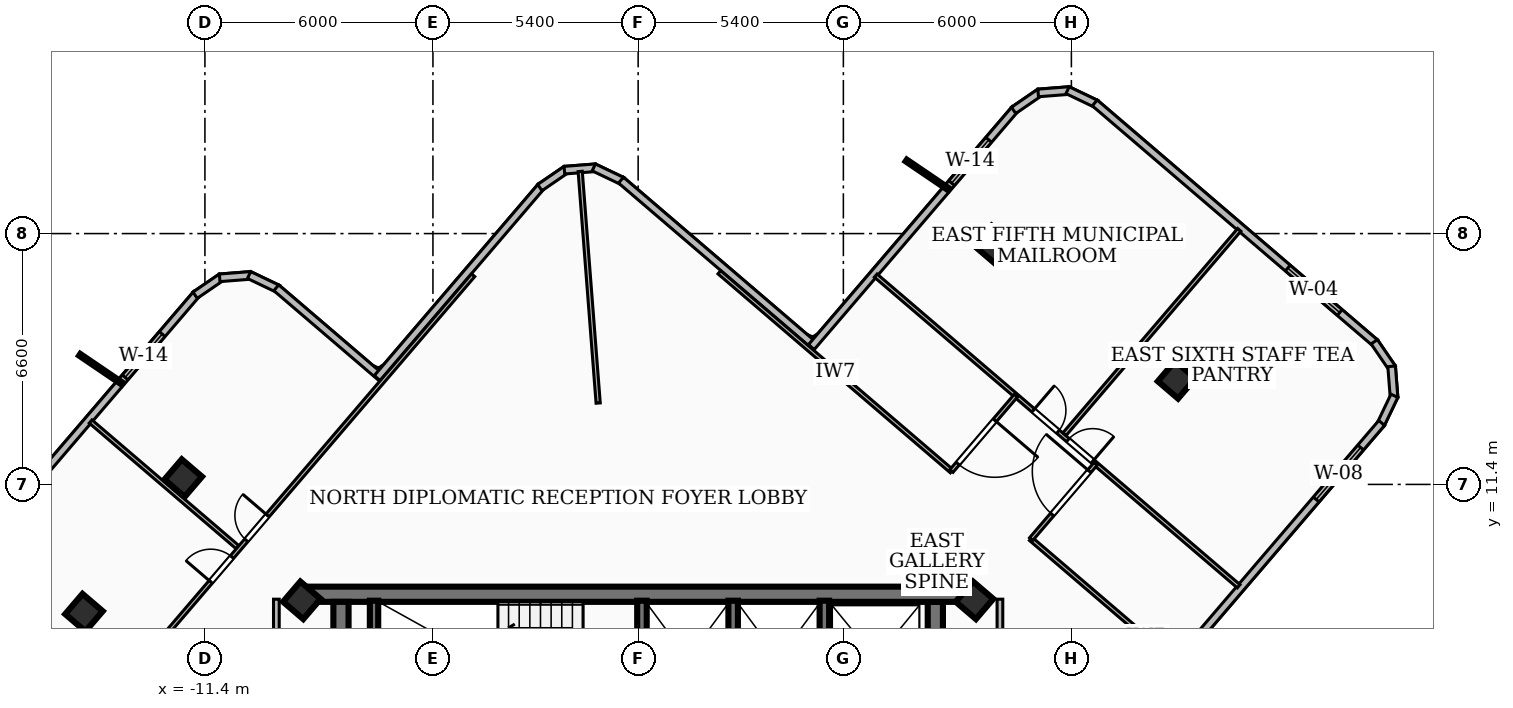
"""IFC4 building model, lengths in metres.
Left out: names, types, materials, properties, quantities, classifications, styles, units other than length and angle.
Written with IfcOpenShell. Run it as: python <this file> out.ifc"""

import sys

from ifc_helpers import new_model, si_unit, direction, frame, frame_2d, origin, origin_2d, place, context, subcontext, project, spatial, rectangle, extrude, element, fill, save


model = new_model("IFC4")
c1 = context("Model", 3, precision=1e-05, world=origin(), true_north=direction((0.0, 1.0)))
c2 = subcontext(c1, "Body", "Model", "MODEL_VIEW")
j1 = project(units=[si_unit("LENGTHUNIT", "METRE"), si_unit("PLANEANGLEUNIT", "RADIAN")], contexts=[c1])
p1 = place(None, origin())
s1 = spatial("IfcSite", under=j1, at=p1, CompositionType="ELEMENT")
p2 = place(p1, origin())
s2 = spatial("IfcBuilding", under=s1, at=p2, CompositionType="ELEMENT")
p3 = place(p2, frame((0.0, 0.0, 250.92)))
s3 = spatial("IfcBuildingStorey", under=s2, at=p3, CompositionType="ELEMENT", Elevation=250.92)
p4 = place(p3, frame((-8.78, 8.51, 0.0), z_axis=(0.0, 0.0, 1.0), x_axis=(1.0, 0.0, 0.0)))
e1 = element("IfcWall", 1, at=p4, inside=s3, PredefinedType="SHEAR", context=c2, shape_type="SweptSolid", body=[
    extrude(rectangle(XDim=17.56, YDim=0.4, at=frame_2d((8.78, 0.0))), origin(), (0.0, 0.0, 1.0), 3.16),
])
for number, where, z_axis, x_axis in (
    (2, (-7.82, 1.95, 0.0), (0.0, 0.0, 1.0), (0.0, 1.0, 0.0)),
    (3, (7.82, 8.31, 0.0), (0.0, 0.0, 1.0), (0.0, -1.0, 0.0)),
):
    element("IfcWall", number, at=place(p3, frame(where, z_axis=z_axis, x_axis=x_axis)), inside=s3, PredefinedType="SHEAR", context=c2, shape_type="SweptSolid", body=[
        extrude(rectangle(XDim=6.36, YDim=0.4, at=frame_2d((3.18, 0.0))), origin(), (0.0, 0.0, 1.0), 3.16),
    ])
p5 = place(p3, frame((-6.95, 5.28, 0.0), z_axis=(0.0, 0.0, 1.0), x_axis=(0.0, 1.0, 0.0)))
e4 = element("IfcWall", 4, at=p5, inside=s3, PredefinedType="SOLIDWALL", context=c2, shape_type="SweptSolid", body=[
    extrude(rectangle(XDim=3.06, YDim=0.22, at=frame_2d((1.53, 0.0))), origin(), (0.0, 0.0, 1.0), 3.16),
])
for number, where, z_axis, x_axis in (
    (5, (0.1, 5.3, 0.0), (0.0, 0.0, 1.0), (0.0, 1.0, 0.0)),
    (6, (2.5, 5.3, 0.0), (0.0, 0.0, 1.0), (0.0, 1.0, 0.0)),
    (7, (4.9, 5.3, 0.0), (0.0, 0.0, 1.0), (0.0, 1.0, 0.0)),
):
    element("IfcWall", number, at=place(p3, frame(where, z_axis=z_axis, x_axis=x_axis)), inside=s3, PredefinedType="SOLIDWALL", context=c2, shape_type="SweptSolid", body=[
        extrude(rectangle(XDim=3.04, YDim=0.25, at=frame_2d((1.52, 0.0))), origin(), (0.0, 0.0, 1.0), 3.16),
    ])
for number, where, z_axis, x_axis in (
    (8, (-8.85, 8.35, 0.0), (0.0, 0.0, 1.0), (0.65, 0.76, 0.0)),
    (9, (8.85, 8.35, 0.0), (0.0, 0.0, 1.0), (0.65, 0.76, 0.0)),
    (10, (14.169, 14.152, 0.0), (0.0, 0.0, 1.0), (0.65, 0.76, 0.0)),
    (11, (9.341, 17.714, 0.0), (0.0, 0.0, 1.0), (0.65, 0.76, 0.0)),
    (12, (-11.971, 11.566, 0.0), (0.0, 0.0, 1.0), (0.65, 0.76, 0.0)),
    (13, (-14.583, 8.026, 0.0), (0.0, 0.0, 1.0), (0.65, 0.76, 0.0)),
):
    element("IfcColumn", number, at=place(p3, frame(where, z_axis=z_axis, x_axis=x_axis)), inside=s3, PredefinedType="COLUMN", context=c2, shape_type="SweptSolid", body=[
        extrude(rectangle(XDim=0.7, YDim=0.7, at=origin_2d()), origin(), (0.0, 0.0, 1.0), 3.42),
    ])
p6 = place(p3, frame((-17.943, 9.024, 0.0), z_axis=(0.0, 0.0, 1.0), x_axis=(0.650218389303, 0.759747356831, 0.0)))
e14 = element("IfcWall", 14, at=p6, inside=s3, PredefinedType="SOLIDWALL", context=c2, shape_type="SweptSolid", body=[
    extrude(rectangle(XDim=9.723, YDim=0.2, at=frame_2d((4.861, 0.0))), origin(), (0.0, 0.0, 1.0), 3.16),
])
p7 = place(p6, frame((6.834, 0.0, 0.85)))
e15 = element("IfcOpeningElement", 15, at=p7, cuts=e14, PredefinedType="OPENING", context=c2, shape_type="SweptSolid", body=[
    extrude(rectangle(XDim=1.5, YDim=1.5, at=frame_2d((0.75, 0.75))), frame((0.0, 0.11, 0.0), z_axis=(0.0, -1.0, 0.0), x_axis=(1.0, 0.0, 0.0)), (0.0, 0.0, 1.0), 0.22),
])
p8 = place(p3, frame((-11.658, 16.378, 0.0), z_axis=(0.0, 0.0, 1.0), x_axis=(0.824907237821, 0.565268121329, 0.0)))
e16 = element("IfcWall", 16, at=p8, inside=s3, PredefinedType="SOLIDWALL", context=c2, shape_type="SweptSolid", body=[
    extrude(rectangle(XDim=0.839, YDim=0.2, at=frame_2d((0.419, 0.0))), origin(), (0.0, 0.0, 1.0), 3.16),
])
p9 = place(p3, frame((-11.012, 16.836, 0.0), z_axis=(0.0, 0.0, 1.0), x_axis=(0.996986164412, 0.077579558977, 0.0)))
e17 = element("IfcWall", 17, at=p9, inside=s3, PredefinedType="SOLIDWALL", context=c2, shape_type="SweptSolid", body=[
    extrude(rectangle(XDim=0.824, YDim=0.2, at=frame_2d((0.412, 0.0))), origin(), (0.0, 0.0, 1.0), 3.16),
])
p10 = place(p3, frame((-10.238, 16.909, 0.0), z_axis=(0.0, 0.0, 1.0), x_axis=(0.902473334209, -0.430745726666, 0.0)))
e18 = element("IfcWall", 18, at=p10, inside=s3, PredefinedType="SOLIDWALL", context=c2, shape_type="SweptSolid", body=[
    extrude(rectangle(XDim=0.84, YDim=0.2, at=frame_2d((0.42, 0.0))), origin(), (0.0, 0.0, 1.0), 3.16),
])
p11 = place(p3, frame((-9.522, 16.574, 0.0), z_axis=(0.0, 0.0, 1.0), x_axis=(0.759914066759, -0.650023546606, 0.0)))
e19 = element("IfcWall", 19, at=p11, inside=s3, PredefinedType="SOLIDWALL", context=c2, shape_type="SweptSolid", body=[
    extrude(rectangle(XDim=3.641, YDim=0.2, at=frame_2d((1.821, 0.0))), origin(), (0.0, 0.0, 1.0), 3.16),
])
p12 = place(p3, frame((-6.868, 14.198, 0.0), z_axis=(0.0, 0.0, 1.0), x_axis=(0.650240147413, 0.759728734939, 0.0)))
e20 = element("IfcWall", 20, at=p12, inside=s3, PredefinedType="SOLIDWALL", context=c2, shape_type="SweptSolid", body=[
    extrude(rectangle(XDim=6.64, YDim=0.2, at=frame_2d((3.32, 0.0))), origin(), (0.0, 0.0, 1.0), 3.16),
])
p13 = place(p3, frame((-2.587, 19.21, 0.0), z_axis=(0.0, 0.0, 1.0), x_axis=(0.824907237821, 0.565268121329, 0.0)))
e21 = element("IfcWall", 21, at=p13, inside=s3, PredefinedType="SOLIDWALL", context=c2, shape_type="SweptSolid", body=[
    extrude(rectangle(XDim=0.839, YDim=0.2, at=frame_2d((0.419, 0.0))), origin(), (0.0, 0.0, 1.0), 3.16),
])
p14 = place(p3, frame((-1.941, 19.668, 0.0), z_axis=(0.0, 0.0, 1.0), x_axis=(0.996986164412, 0.077579558977, 0.0)))
e22 = element("IfcWall", 22, at=p14, inside=s3, PredefinedType="SOLIDWALL", context=c2, shape_type="SweptSolid", body=[
    extrude(rectangle(XDim=0.824, YDim=0.2, at=frame_2d((0.412, 0.0))), origin(), (0.0, 0.0, 1.0), 3.16),
])
p15 = place(p3, frame((-1.167, 19.741, 0.0), z_axis=(0.0, 0.0, 1.0), x_axis=(0.902360330408, -0.430982405796, 0.0)))
e23 = element("IfcWall", 23, at=p15, inside=s3, PredefinedType="SOLIDWALL", context=c2, shape_type="SweptSolid", body=[
    extrude(rectangle(XDim=0.84, YDim=0.2, at=frame_2d((0.42, 0.0))), origin(), (0.0, 0.0, 1.0), 3.16),
])
p16 = place(p3, frame((-0.451, 19.406, 0.0), z_axis=(0.0, 0.0, 1.0), x_axis=(0.759775314842, -0.650185720357, 0.0)))
e24 = element("IfcWall", 24, at=p16, inside=s3, PredefinedType="SOLIDWALL", context=c2, shape_type="SweptSolid", body=[
    extrude(rectangle(XDim=6.741, YDim=0.2, at=frame_2d((3.371, 0.0))), origin(), (0.0, 0.0, 1.0), 3.16),
])
p17 = place(p3, frame((4.558, 15.014, 0.0), z_axis=(0.0, 0.0, 1.0), x_axis=(0.650254487329, 0.759716461391, 0.0)))
e25 = element("IfcWall", 25, at=p17, inside=s3, PredefinedType="SOLIDWALL", context=c2, shape_type="SweptSolid", body=[
    extrude(rectangle(XDim=8.241, YDim=0.2, at=frame_2d((4.121, 0.0))), origin(), (0.0, 0.0, 1.0), 3.16),
])
p18 = place(p17, frame((5.678, 0.0, 0.85)))
e26 = element("IfcOpeningElement", 26, at=p18, cuts=e25, PredefinedType="OPENING", context=c2, shape_type="SweptSolid", body=[
    extrude(rectangle(XDim=1.5, YDim=1.5, at=frame_2d((0.75, 0.75))), frame((0.0, 0.11, 0.0), z_axis=(0.0, -1.0, 0.0), x_axis=(1.0, 0.0, 0.0)), (0.0, 0.0, 1.0), 0.22),
])
p19 = place(p3, frame((9.88, 21.242, 0.0), z_axis=(0.0, 0.0, 1.0), x_axis=(0.825000211037, 0.565132419694, 0.0)))
e27 = element("IfcWall", 27, at=p19, inside=s3, PredefinedType="SOLIDWALL", context=c2, shape_type="SweptSolid", body=[
    extrude(rectangle(XDim=0.839, YDim=0.2, at=frame_2d((0.419, 0.0))), origin(), (0.0, 0.0, 1.0), 3.16),
])
p20 = place(p3, frame((10.526, 21.7, 0.0), z_axis=(0.0, 0.0, 1.0), x_axis=(0.996986164412, 0.077579558977, 0.0)))
e28 = element("IfcWall", 28, at=p20, inside=s3, PredefinedType="SOLIDWALL", context=c2, shape_type="SweptSolid", body=[
    extrude(rectangle(XDim=0.824, YDim=0.2, at=frame_2d((0.412, 0.0))), origin(), (0.0, 0.0, 1.0), 3.16),
])
p21 = place(p3, frame((11.3, 21.773, 0.0), z_axis=(0.0, 0.0, 1.0), x_axis=(0.902089895834, -0.431548166297, 0.0)))
e29 = element("IfcWall", 29, at=p21, inside=s3, PredefinedType="SOLIDWALL", context=c2, shape_type="SweptSolid", body=[
    extrude(rectangle(XDim=0.839, YDim=0.2, at=frame_2d((0.419, 0.0))), origin(), (0.0, 0.0, 1.0), 3.16),
])
p22 = place(p3, frame((12.015, 21.438, 0.0), z_axis=(0.0, 0.0, 1.0), x_axis=(0.75980042935, -0.650156371622, 0.0)))
e30 = element("IfcWall", 30, at=p22, inside=s3, PredefinedType="SOLIDWALL", context=c2, shape_type="SweptSolid", body=[
    extrude(rectangle(XDim=9.724, YDim=0.2, at=frame_2d((4.862, 0.0))), origin(), (0.0, 0.0, 1.0), 3.16),
])
p23 = place(p22, frame((6.684, 0.0, 0.85)))
e31 = element("IfcOpeningElement", 31, at=p23, cuts=e30, PredefinedType="OPENING", context=c2, shape_type="SweptSolid", body=[
    extrude(rectangle(XDim=1.8, YDim=2.0, at=frame_2d((0.9, 1.0))), frame((0.0, 0.11, 0.0), z_axis=(0.0, -1.0, 0.0), x_axis=(1.0, 0.0, 0.0)), (0.0, 0.0, 1.0), 0.22),
])
p24 = place(p3, frame((19.37, 15.153, 0.0), z_axis=(0.0, 0.0, 1.0), x_axis=(0.564140869434, -0.825678556967, 0.0)))
e32 = element("IfcWall", 32, at=p24, inside=s3, PredefinedType="SOLIDWALL", context=c2, shape_type="SweptSolid", body=[
    extrude(rectangle(XDim=0.838, YDim=0.2, at=frame_2d((0.419, 0.0))), origin(), (0.0, 0.0, 1.0), 3.16),
])
p25 = place(p3, frame((19.827, 14.507, 0.0), z_axis=(0.0, 0.0, 1.0), x_axis=(0.07778202678, -0.996970388883, 0.0)))
e33 = element("IfcWall", 33, at=p25, inside=s3, PredefinedType="SOLIDWALL", context=c2, shape_type="SweptSolid", body=[
    extrude(rectangle(XDim=0.825, YDim=0.2, at=frame_2d((0.413, 0.0))), origin(), (0.0, 0.0, 1.0), 3.16),
])
p26 = place(p3, frame((19.9, 13.732, 0.0), z_axis=(0.0, 0.0, 1.0), x_axis=(-0.431311318386, -0.902203162615, 0.0)))
e34 = element("IfcWall", 34, at=p26, inside=s3, PredefinedType="SOLIDWALL", context=c2, shape_type="SweptSolid", body=[
    extrude(rectangle(XDim=0.839, YDim=0.2, at=frame_2d((0.419, 0.0))), origin(), (0.0, 0.0, 1.0), 3.16),
])
p27 = place(p3, frame((19.565, 13.017, 0.0), z_axis=(0.0, 0.0, 1.0), x_axis=(-0.650112914542, -0.759837613142, 0.0)))
e35 = element("IfcWall", 35, at=p27, inside=s3, PredefinedType="SOLIDWALL", context=c2, shape_type="SweptSolid", body=[
    extrude(rectangle(XDim=8.241, YDim=0.2, at=frame_2d((4.121, 0.0))), origin(), (0.0, 0.0, 1.0), 3.16),
])
p28 = place(p27, frame((0.85, 0.0, 0.85)))
e36 = element("IfcOpeningElement", 36, at=p28, cuts=e35, PredefinedType="OPENING", context=c2, shape_type="SweptSolid", body=[
    extrude(rectangle(XDim=1.8, YDim=1.8, at=frame_2d((0.9, 0.9))), frame((0.0, 0.11, 0.0), z_axis=(0.0, -1.0, 0.0), x_axis=(1.0, 0.0, 0.0)), (0.0, 0.0, 1.0), 0.22),
])
p29 = place(p3, frame((-9.52, 1.75, 0.0), z_axis=(0.0, 0.0, 1.0), x_axis=(0.0, 1.0, 0.0)))
e37 = element("IfcWall", 37, at=p29, inside=s3, PredefinedType="PARTITIONING", context=c2, shape_type="SweptSolid", body=[
    extrude(rectangle(XDim=6.63, YDim=0.15, at=frame_2d((3.315, 0.0))), origin(), (0.0, 0.0, 1.0), 2.53),
])
p30 = place(p3, frame((9.52, 1.75, 0.0), z_axis=(0.0, 0.0, 1.0), x_axis=(0.0, 1.0, 0.0)))
e38 = element("IfcWall", 38, at=p30, inside=s3, PredefinedType="PARTITIONING", context=c2, shape_type="SweptSolid", body=[
    extrude(rectangle(XDim=6.63, YDim=0.15, at=frame_2d((3.315, 0.0))), origin(), (0.0, 0.0, 1.0), 3.16),
])
p31 = place(p3, frame((-1.052, 13.54, 0.0), z_axis=(0.0, 0.0, 1.0), x_axis=(-0.077356131702, 0.997003525013, 0.0)))
e39 = element("IfcWall", 39, at=p31, inside=s3, PredefinedType="PARTITIONING", context=c2, shape_type="SweptSolid", body=[
    extrude(rectangle(XDim=6.113, YDim=0.11, at=frame_2d((3.057, 0.0))), origin(), (0.0, 0.0, 1.0), 3.16),
])
p32 = place(p3, frame((8.251, 11.747, 0.0), z_axis=(0.0, 0.0, 1.0), x_axis=(-0.759658945325, 0.650321679469, 0.0)))
e40 = element("IfcWall", 40, at=p32, inside=s3, PredefinedType="PARTITIONING", context=c2, shape_type="SweptSolid", body=[
    extrude(rectangle(XDim=8.05, YDim=0.11, at=frame_2d((4.025, 0.0))), origin(), (0.0, 0.0, 1.0), 3.16),
])
p33 = place(p3, frame((16.372, 4.796, 0.0), z_axis=(0.0, 0.0, 1.0), x_axis=(-0.759640163548, 0.650343618348, 0.0)))
e41 = element("IfcWall", 41, at=p33, inside=s3, PredefinedType="PARTITIONING", context=c2, shape_type="SweptSolid", body=[
    extrude(rectangle(XDim=7.95, YDim=0.11, at=frame_2d((3.975, 0.0))), origin(), (0.0, 0.0, 1.0), 2.53),
])
p34 = place(p3, frame((9.941, 13.737, 0.0), z_axis=(0.0, 0.0, 1.0), x_axis=(-0.65016721503, -0.759791150581, 0.0)))
e42 = element("IfcWall", 42, at=p34, inside=s3, PredefinedType="PARTITIONING", context=c2, shape_type="SweptSolid", body=[
    extrude(rectangle(XDim=2.61, YDim=0.11, at=frame_2d((1.305, 0.0))), origin(), (0.0, 0.0, 1.0), 2.53),
])
p35 = place(p34, frame((0.855, 0.0, 0.0)))
e43 = element("IfcOpeningElement", 43, at=p35, cuts=e42, PredefinedType="OPENING", context=c2, shape_type="SweptSolid", body=[
    extrude(rectangle(XDim=1.5, YDim=2.12, at=frame_2d((0.75, 1.06))), frame((0.0, 0.065, 0.0), z_axis=(0.0, -1.0, 0.0), x_axis=(1.0, 0.0, 0.0)), (0.0, 0.0, 1.0), 0.13),
])
p36 = place(p3, frame((10.34, 9.959, 0.0), z_axis=(0.0, 0.0, 1.0), x_axis=(0.650429323352, 0.759566781346, 0.0)))
e44 = element("IfcWall", 44, at=p36, inside=s3, PredefinedType="PARTITIONING", context=c2, shape_type="SweptSolid", body=[
    extrude(rectangle(XDim=2.611, YDim=0.11, at=frame_2d((1.305, 0.0))), origin(), (0.0, 0.0, 1.0), 2.53),
])
p37 = place(p36, frame((0.855, 0.0, 0.0)))
e45 = element("IfcOpeningElement", 45, at=p37, cuts=e44, PredefinedType="OPENING", context=c2, shape_type="SweptSolid", body=[
    extrude(rectangle(XDim=1.5, YDim=2.12, at=frame_2d((0.75, 1.06))), frame((0.0, 0.065, 0.0), z_axis=(0.0, -1.0, 0.0), x_axis=(1.0, 0.0, 0.0)), (0.0, 0.0, 1.0), 0.13),
])
p38 = place(p3, frame((11.218, 12.722, 0.0), z_axis=(0.0, 0.0, 1.0), x_axis=(0.650148936059, 0.75980679185, 0.0)))
e46 = element("IfcWall", 46, at=p38, inside=s3, PredefinedType="PARTITIONING", context=c2, shape_type="SweptSolid", body=[
    extrude(rectangle(XDim=7.075, YDim=0.11, at=frame_2d((3.538, 0.0))), origin(), (0.0, 0.0, 1.0), 3.16),
])
p39 = place(p3, frame((6.252, 16.894, 0.0), z_axis=(0.0, 0.0, 1.0), x_axis=(0.759715677597, -0.650255403063, 0.0)))
e47 = element("IfcWall", 47, at=p39, inside=s3, PredefinedType="PARTITIONING", context=c2, shape_type="SweptSolid", body=[
    extrude(rectangle(XDim=12.571, YDim=0.11, at=frame_2d((6.285, 0.0))), origin(), (0.0, 0.0, 1.0), 2.53),
])
p40 = place(p39, frame((6.655, 0.0, 0.0)))
e48 = element("IfcOpeningElement", 48, at=p40, cuts=e47, PredefinedType="OPENING", context=c2, shape_type="SweptSolid", body=[
    extrude(rectangle(XDim=0.86, YDim=2.04, at=frame_2d((0.43, 1.02))), frame((0.0, 0.065, 0.0), z_axis=(0.0, -1.0, 0.0), x_axis=(1.0, 0.0, 0.0)), (0.0, 0.0, 1.0), 0.13),
])
p41 = place(p39, frame((5.455, 0.0, 0.0)))
e49 = element("IfcOpeningElement", 49, at=p41, cuts=e47, PredefinedType="OPENING", context=c2, shape_type="SweptSolid", body=[
    extrude(rectangle(XDim=0.86, YDim=2.04, at=frame_2d((0.43, 1.02))), frame((0.0, 0.065, 0.0), z_axis=(0.0, -1.0, 0.0), x_axis=(1.0, 0.0, 0.0)), (0.0, 0.0, 1.0), 0.13),
])
p42 = place(p3, frame((-10.544, 9.749, 0.0), z_axis=(0.0, 0.0, 1.0), x_axis=(-0.759849347966, 0.650099198889, 0.0)))
e50 = element("IfcWall", 50, at=p42, inside=s3, PredefinedType="PARTITIONING", context=c2, shape_type="SweptSolid", body=[
    extrude(rectangle(XDim=5.085, YDim=0.11, at=frame_2d((2.542, 0.0))), origin(), (0.0, 0.0, 1.0), 3.16),
])
p43 = place(p3, frame((-17.437, 1.604, 0.0), z_axis=(0.0, 0.0, 1.0), x_axis=(0.650265099033, 0.759707378522, 0.0)))
e51 = element("IfcWall", 51, at=p43, inside=s3, PredefinedType="PARTITIONING", context=c2, shape_type="SweptSolid", body=[
    extrude(rectangle(XDim=20.139, YDim=0.11, at=frame_2d((10.07, 0.0))), origin(), (0.0, 0.0, 1.0), 2.53),
])
p44 = place(p43, frame((10.959, 0.0, 0.0)))
e52 = element("IfcOpeningElement", 52, at=p44, cuts=e51, PredefinedType="OPENING", context=c2, shape_type="SweptSolid", body=[
    extrude(rectangle(XDim=0.86, YDim=2.04, at=frame_2d((0.43, 1.02))), frame((0.0, 0.065, 0.0), z_axis=(0.0, -1.0, 0.0), x_axis=(1.0, 0.0, 0.0)), (0.0, 0.0, 1.0), 0.13),
])
p45 = place(p43, frame((9.519, 0.0, 0.0)))
e53 = element("IfcOpeningElement", 53, at=p45, cuts=e51, PredefinedType="OPENING", context=c2, shape_type="SweptSolid", body=[
    extrude(rectangle(XDim=0.86, YDim=2.04, at=frame_2d((0.43, 1.02))), frame((0.0, 0.065, 0.0), z_axis=(0.0, -1.0, 0.0), x_axis=(1.0, 0.0, 0.0)), (0.0, 0.0, 1.0), 0.13),
])
p46 = place(p7, origin())
e54 = element("IfcWindow", 54, at=p46, inside=s3, PartitioningType="SINGLE_PANEL", PredefinedType="WINDOW", context=c2, shape_type="SweptSolid", body=[
    extrude(rectangle(XDim=1.5, YDim=1.5, at=frame_2d((0.75, 0.75))), frame((0.0, 0.03, 0.0), z_axis=(0.0, -1.0, 0.0), x_axis=(1.0, 0.0, 0.0)), (0.0, 0.0, 1.0), 0.06),
])
fill(e15, e54)
p47 = place(p18, origin())
e55 = element("IfcWindow", 55, at=p47, inside=s3, PartitioningType="SINGLE_PANEL", PredefinedType="WINDOW", context=c2, shape_type="SweptSolid", body=[
    extrude(rectangle(XDim=1.5, YDim=1.5, at=frame_2d((0.75, 0.75))), frame((0.0, 0.03, 0.0), z_axis=(0.0, -1.0, 0.0), x_axis=(1.0, 0.0, 0.0)), (0.0, 0.0, 1.0), 0.06),
])
fill(e26, e55)
p48 = place(p23, origin())
e56 = element("IfcWindow", 56, at=p48, inside=s3, PartitioningType="SINGLE_PANEL", PredefinedType="WINDOW", context=c2, shape_type="SweptSolid", body=[
    extrude(rectangle(XDim=1.8, YDim=2.0, at=frame_2d((0.9, 1.0))), frame((0.0, 0.03, 0.0), z_axis=(0.0, -1.0, 0.0), x_axis=(1.0, 0.0, 0.0)), (0.0, 0.0, 1.0), 0.06),
])
fill(e31, e56)
p49 = place(p28, origin())
e57 = element("IfcWindow", 57, at=p49, inside=s3, PartitioningType="SINGLE_PANEL", PredefinedType="WINDOW", context=c2, shape_type="SweptSolid", body=[
    extrude(rectangle(XDim=1.8, YDim=1.8, at=frame_2d((0.9, 0.9))), frame((0.0, 0.03, 0.0), z_axis=(0.0, -1.0, 0.0), x_axis=(1.0, 0.0, 0.0)), (0.0, 0.0, 1.0), 0.06),
])
fill(e36, e57)
p50 = place(p35, origin())
e58 = element("IfcDoor", 58, at=p50, inside=s3, OperationType="SINGLE_SWING_LEFT", PredefinedType="DOOR", context=c2, shape_type="SweptSolid", body=[
    extrude(rectangle(XDim=1.5, YDim=2.12, at=frame_2d((0.75, 1.06))), frame((0.0, 0.025, 0.0), z_axis=(0.0, -1.0, 0.0), x_axis=(1.0, 0.0, 0.0)), (0.0, 0.0, 1.0), 0.05),
])
fill(e43, e58)
p51 = place(p37, origin())
e59 = element("IfcDoor", 59, at=p51, inside=s3, OperationType="SINGLE_SWING_RIGHT", PredefinedType="DOOR", context=c2, shape_type="SweptSolid", body=[
    extrude(rectangle(XDim=1.5, YDim=2.12, at=frame_2d((0.75, 1.06))), frame((0.0, 0.025, 0.0), z_axis=(0.0, -1.0, 0.0), x_axis=(1.0, 0.0, 0.0)), (0.0, 0.0, 1.0), 0.05),
])
fill(e45, e59)
p52 = place(p40, origin())
e60 = element("IfcDoor", 60, at=p52, inside=s3, OperationType="SINGLE_SWING_RIGHT", PredefinedType="DOOR", context=c2, shape_type="SweptSolid", body=[
    extrude(rectangle(XDim=0.86, YDim=2.04, at=frame_2d((0.43, 1.02))), frame((0.0, 0.025, 0.0), z_axis=(0.0, -1.0, 0.0), x_axis=(1.0, 0.0, 0.0)), (0.0, 0.0, 1.0), 0.05),
])
fill(e48, e60)
p53 = place(p41, origin())
e61 = element("IfcDoor", 61, at=p53, inside=s3, OperationType="SINGLE_SWING_LEFT", PredefinedType="DOOR", context=c2, shape_type="SweptSolid", body=[
    extrude(rectangle(XDim=0.86, YDim=2.04, at=frame_2d((0.43, 1.02))), frame((0.0, 0.025, 0.0), z_axis=(0.0, -1.0, 0.0), x_axis=(1.0, 0.0, 0.0)), (0.0, 0.0, 1.0), 0.05),
])
fill(e49, e61)
p54 = place(p44, origin())
e62 = element("IfcDoor", 62, at=p54, inside=s3, OperationType="SINGLE_SWING_RIGHT", PredefinedType="DOOR", context=c2, shape_type="SweptSolid", body=[
    extrude(rectangle(XDim=0.86, YDim=2.04, at=frame_2d((0.43, 1.02))), frame((0.0, 0.025, 0.0), z_axis=(0.0, -1.0, 0.0), x_axis=(1.0, 0.0, 0.0)), (0.0, 0.0, 1.0), 0.05),
])
fill(e52, e62)
p55 = place(p45, origin())
e63 = element("IfcDoor", 63, at=p55, inside=s3, OperationType="SINGLE_SWING_LEFT", PredefinedType="DOOR", context=c2, shape_type="SweptSolid", body=[
    extrude(rectangle(XDim=0.86, YDim=2.04, at=frame_2d((0.43, 1.02))), frame((0.0, 0.025, 0.0), z_axis=(0.0, -1.0, 0.0), x_axis=(1.0, 0.0, 0.0)), (0.0, 0.0, 1.0), 0.05),
])
fill(e53, e63)
save(model, sys.argv[1])
